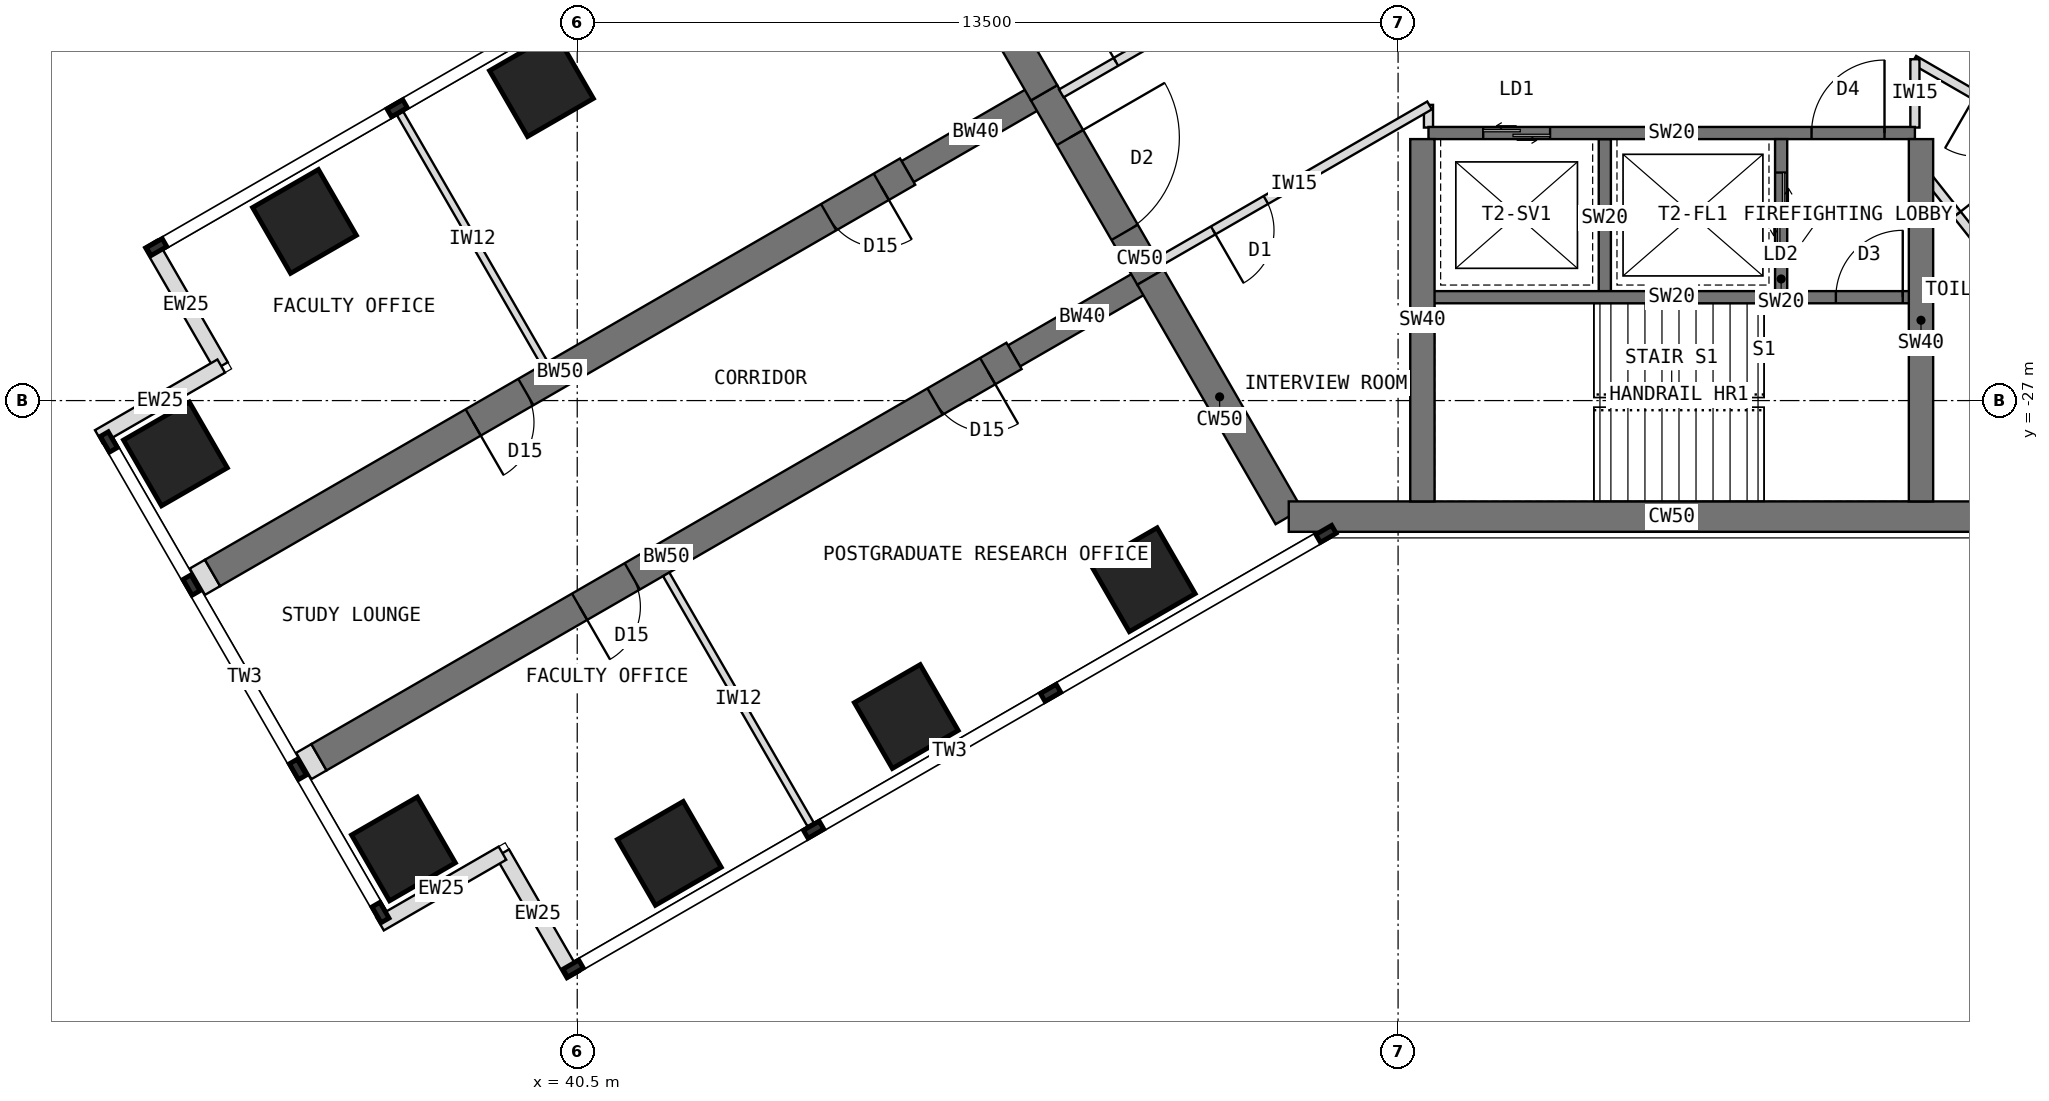
"""IFC4 building model, lengths in metres.
Left out: names, types, materials, properties, quantities, classifications, styles, units other than length and angle.
Written with IfcOpenShell. Run it as: python <this file> out.ifc"""

import sys

from ifc_helpers import new_model, si_unit, direction, frame, frame_2d, origin, origin_2d, place, context, subcontext, project, spatial, rectangle, extrude, element, fill, save


model = new_model("IFC4")
c1 = context("Model", 3, precision=1e-05, world=origin(), true_north=direction((0.0, 1.0)))
c2 = subcontext(c1, "Body", "Model", "MODEL_VIEW")
j1 = project(units=[si_unit("LENGTHUNIT", "METRE"), si_unit("PLANEANGLEUNIT", "RADIAN")], contexts=[c1])
p1 = place(None, origin())
s1 = spatial("IfcSite", under=j1, at=p1, CompositionType="ELEMENT")
p2 = place(p1, origin())
s2 = spatial("IfcBuilding", under=s1, at=p2, CompositionType="ELEMENT")
p3 = place(p2, frame((0.0, 0.0, 170.5)))
s3 = spatial("IfcBuildingStorey", under=s2, at=p3, CompositionType="ELEMENT", Elevation=170.5)
p4 = place(p3, frame((45.904, -18.0, 0.0), z_axis=(0.0, 0.0, 1.0), x_axis=(0.500024481964, -0.866011268655, 0.0)))
e1 = element("IfcWall", 1, at=p4, inside=s3, PredefinedType="SHEAR", context=c2, shape_type="SweptSolid", body=[
    extrude(rectangle(XDim=4.548, YDim=0.5, at=frame_2d((2.274, 0.0))), origin(), (0.0, 0.0, 1.0), 4.0),
])
p5 = place(p3, frame((48.178, -21.939, 0.0), z_axis=(0.0, 0.0, 1.0), x_axis=(0.500010275428, -0.866019471182, 0.0)))
e2 = element("IfcWall", 2, at=p5, inside=s3, PredefinedType="SHEAR", context=c2, shape_type="SweptSolid", body=[
    extrude(rectangle(XDim=3.5, YDim=0.5, at=frame_2d((1.75, 0.0))), origin(), (0.0, 0.0, 1.0), 4.0),
])
p6 = place(p5, frame((0.85, 0.0, 0.0)))
e3 = element("IfcOpeningElement", 3, at=p6, cuts=e2, PredefinedType="OPENING", context=c2, shape_type="SweptSolid", body=[
    extrude(rectangle(XDim=1.8, YDim=2.1, at=frame_2d((0.9, 1.05))), frame((0.0, 0.26, 0.0), z_axis=(0.0, -1.0, 0.0), x_axis=(1.0, 0.0, 0.0)), (0.0, 0.0, 1.0), 0.52),
])
p7 = place(p3, frame((49.928, -24.97, 0.0), z_axis=(0.0, 0.0, 1.0), x_axis=(0.499984222037, -0.866034513004, 0.0)))
e4 = element("IfcWall", 4, at=p7, inside=s3, PredefinedType="SHEAR", context=c2, shape_type="SweptSolid", body=[
    extrude(rectangle(XDim=4.548, YDim=0.5, at=frame_2d((2.274, 0.0))), origin(), (0.0, 0.0, 1.0), 4.0),
])
p8 = place(p3, frame((52.202, -28.908, 0.0), z_axis=(0.0, 0.0, 1.0), x_axis=(1.0, 0.0, 0.0)))
e5 = element("IfcWall", 5, at=p8, inside=s3, PredefinedType="SHEAR", context=c2, shape_type="SweptSolid", body=[
    extrude(rectangle(XDim=12.596, YDim=0.5, at=frame_2d((6.298, 0.0))), origin(), (0.0, 0.0, 1.0), 4.0),
])
p9 = place(p3, frame((49.928, -24.97, 0.0), z_axis=(0.0, 0.0, 1.0), x_axis=(-0.866031863473, -0.499988811324, 0.0)))
e6 = element("IfcWall", 6, at=p9, inside=s3, PredefinedType="SHEAR", context=c2, shape_type="SweptSolid", body=[
    extrude(rectangle(XDim=2.592, YDim=0.4, at=frame_2d((1.296, 0.0))), origin(), (0.0, 0.0, 1.0), 4.0),
])
p10 = place(p3, frame((47.684, -26.266, 0.0), z_axis=(0.0, 0.0, 1.0), x_axis=(-0.866027579429, -0.499996231654, 0.0)))
e7 = element("IfcWall", 7, at=p10, inside=s3, PredefinedType="SHEAR", context=c2, shape_type="SweptSolid", body=[
    extrude(rectangle(XDim=13.2, YDim=0.5, at=frame_2d((6.6, 0.0))), origin(), (0.0, 0.0, 1.0), 4.0),
])
p11 = place(p10, frame((0.5, 0.0, 0.0)))
e8 = element("IfcOpeningElement", 8, at=p11, cuts=e7, PredefinedType="OPENING", context=c2, shape_type="SweptSolid", body=[
    extrude(rectangle(XDim=1.0, YDim=2.1, at=frame_2d((0.5, 1.05))), frame((0.0, 0.26, 0.0), z_axis=(0.0, -1.0, 0.0), x_axis=(1.0, 0.0, 0.0)), (0.0, 0.0, 1.0), 0.52),
])
p12 = place(p10, frame((7.25, 0.0, 0.0)))
e9 = element("IfcOpeningElement", 9, at=p12, cuts=e7, PredefinedType="OPENING", context=c2, shape_type="SweptSolid", body=[
    extrude(rectangle(XDim=1.0, YDim=2.1, at=frame_2d((0.5, 1.05))), frame((0.0, 0.26, 0.0), z_axis=(0.0, -1.0, 0.0), x_axis=(1.0, 0.0, 0.0)), (0.0, 0.0, 1.0), 0.52),
])
p13 = place(p3, frame((48.178, -21.939, 0.0), z_axis=(0.0, 0.0, 1.0), x_axis=(-0.866072649678, -0.499918158782, 0.0)))
e10 = element("IfcWall", 10, at=p13, inside=s3, PredefinedType="SHEAR", context=c2, shape_type="SweptSolid", body=[
    extrude(rectangle(XDim=2.592, YDim=0.4, at=frame_2d((1.296, 0.0))), origin(), (0.0, 0.0, 1.0), 4.0),
])
p14 = place(p3, frame((45.934, -23.234, 0.0), z_axis=(0.0, 0.0, 1.0), x_axis=(-0.866019570528, -0.500010103361, 0.0)))
e11 = element("IfcWall", 11, at=p14, inside=s3, PredefinedType="SHEAR", context=c2, shape_type="SweptSolid", body=[
    extrude(rectangle(XDim=13.2, YDim=0.5, at=frame_2d((6.6, 0.0))), origin(), (0.0, 0.0, 1.0), 4.0),
])
p15 = place(p14, frame((0.5, 0.0, 0.0)))
e12 = element("IfcOpeningElement", 12, at=p15, cuts=e11, PredefinedType="OPENING", context=c2, shape_type="SweptSolid", body=[
    extrude(rectangle(XDim=1.0, YDim=2.1, at=frame_2d((0.5, 1.05))), frame((0.0, 0.26, 0.0), z_axis=(0.0, -1.0, 0.0), x_axis=(1.0, 0.0, 0.0)), (0.0, 0.0, 1.0), 0.52),
])
p16 = place(p14, frame((7.25, 0.0, 0.0)))
e13 = element("IfcOpeningElement", 13, at=p16, cuts=e11, PredefinedType="OPENING", context=c2, shape_type="SweptSolid", body=[
    extrude(rectangle(XDim=1.0, YDim=2.1, at=frame_2d((0.5, 1.05))), frame((0.0, 0.26, 0.0), z_axis=(0.0, -1.0, 0.0), x_axis=(1.0, 0.0, 0.0)), (0.0, 0.0, 1.0), 0.52),
])
for number, where, z_axis, x_axis in (
    (14, (49.809, -29.946, 0.0), (0.0, 0.0, 1.0), (0.866, 0.5, 0.0)),
    (15, (45.912, -32.196, 0.0), (0.0, 0.0, 1.0), (0.866, 0.5, 0.0)),
    (16, (39.912, -21.804, 0.0), (0.0, 0.0, 1.0), (0.866, 0.5, 0.0)),
    (17, (42.014, -34.446, 0.0), (0.0, 0.0, 1.0), (0.866, 0.5, 0.0)),
    (18, (36.014, -24.054, 0.0), (0.0, 0.0, 1.0), (0.866, 0.5, 0.0)),
    (19, (37.642, -34.373, 0.0), (0.0, 0.0, 1.0), (0.866, 0.5, 0.0)),
    (20, (33.892, -27.877, 0.0), (0.0, 0.0, 1.0), (0.866, 0.5, 0.0)),
):
    element("IfcColumn", number, at=place(p3, frame(where, z_axis=z_axis, x_axis=x_axis)), inside=s3, PredefinedType="COLUMN", context=c2, shape_type="SweptSolid", body=[
        extrude(rectangle(XDim=1.25, YDim=1.25, at=origin_2d()), origin(), (0.0, 0.0, 1.0), 4.0),
    ])
for number, where, z_axis, x_axis in (
    (21, (40.433, -36.456, 0.0), (0.0, 0.0, 1.0), (-0.5, 0.866, 0.0)),
    (22, (39.27, -34.443, 0.0), (0.0, 0.0, 1.0), (-0.866, -0.5, 0.0)),
    (23, (33.483, -24.419, 0.0), (0.0, 0.0, 1.0), (0.5, -0.866, 0.0)),
    (24, (34.645, -26.432, 0.0), (0.0, 0.0, 1.0), (-0.866, -0.5, 0.0)),
):
    element("IfcWall", number, at=place(p3, frame(where, z_axis=z_axis, x_axis=x_axis)), inside=s3, PredefinedType="STANDARD", context=c2, shape_type="SweptSolid", body=[
        extrude(rectangle(XDim=2.325, YDim=0.25, at=frame_2d((1.163, 0.0))), origin(), (0.0, 0.0, 1.0), 3.8),
    ])
for number, where, z_axis, x_axis in (
    (25, (36.252, -32.865, 0.0), (0.0, 0.0, 1.0), (-0.866, -0.5, 0.0)),
    (26, (34.502, -29.834, 0.0), (0.0, 0.0, 1.0), (-0.866, -0.5, 0.0)),
):
    element("IfcWall", number, at=place(p3, frame(where, z_axis=z_axis, x_axis=x_axis)), inside=s3, PredefinedType="PARTITIONING", context=c2, shape_type="SweptSolid", body=[
        extrude(rectangle(XDim=0.288, YDim=0.5, at=frame_2d((0.144, 0.0))), origin(), (0.0, 0.0, 1.0), 3.8),
    ])
p17 = place(p3, frame((54.5, -22.6, 0.0), z_axis=(0.0, 0.0, 1.0), x_axis=(1.0, 0.0, 0.0)))
e27 = element("IfcWall", 27, at=p17, inside=s3, PredefinedType="SHEAR", context=c2, shape_type="SweptSolid", body=[
    extrude(rectangle(XDim=8.0, YDim=0.2, at=frame_2d((4.0, 0.0))), origin(), (0.0, 0.0, 1.0), 4.0),
])
p18 = place(p17, frame((6.3, 0.0, 0.0)))
e28 = element("IfcOpeningElement", 28, at=p18, cuts=e27, PredefinedType="OPENING", context=c2, shape_type="SweptSolid", body=[
    extrude(rectangle(XDim=1.2, YDim=2.1, at=frame_2d((0.6, 1.05))), frame((0.0, 0.11, 0.0), z_axis=(0.0, -1.0, 0.0), x_axis=(1.0, 0.0, 0.0)), (0.0, 0.0, 1.0), 0.22),
])
p19 = place(p17, frame((0.9, 0.0, 0.0)))
e29 = element("IfcOpeningElement", 29, at=p19, cuts=e27, PredefinedType="OPENING", context=c2, shape_type="SweptSolid", body=[
    extrude(rectangle(XDim=1.1, YDim=2.2, at=frame_2d((0.55, 1.1))), frame((0.0, 0.11, 0.0), z_axis=(0.0, -1.0, 0.0), x_axis=(1.0, 0.0, 0.0)), (0.0, 0.0, 1.0), 0.22),
])
p20 = place(p3, frame((57.4, -22.7, 0.0), z_axis=(0.0, 0.0, 1.0), x_axis=(0.0, -1.0, 0.0)))
e30 = element("IfcWall", 30, at=p20, inside=s3, PredefinedType="SHEAR", context=c2, shape_type="SweptSolid", body=[
    extrude(rectangle(XDim=2.6, YDim=0.2, at=frame_2d((1.3, 0.0))), origin(), (0.0, 0.0, 1.0), 4.0),
])
p21 = place(p3, frame((60.3, -22.7, 0.0), z_axis=(0.0, 0.0, 1.0), x_axis=(0.0, -1.0, 0.0)))
e31 = element("IfcWall", 31, at=p21, inside=s3, PredefinedType="SHEAR", context=c2, shape_type="SweptSolid", body=[
    extrude(rectangle(XDim=2.6, YDim=0.2, at=frame_2d((1.3, 0.0))), origin(), (0.0, 0.0, 1.0), 4.0),
])
p22 = place(p21, frame((0.55, 0.0, 0.0)))
e32 = element("IfcOpeningElement", 32, at=p22, cuts=e31, PredefinedType="OPENING", context=c2, shape_type="SweptSolid", body=[
    extrude(rectangle(XDim=1.3, YDim=2.2, at=frame_2d((0.65, 1.1))), frame((0.0, 0.11, 0.0), z_axis=(0.0, -1.0, 0.0), x_axis=(1.0, 0.0, 0.0)), (0.0, 0.0, 1.0), 0.22),
])
p23 = place(p3, frame((54.5, -25.3, 0.0), z_axis=(0.0, 0.0, 1.0), x_axis=(1.0, 0.0, 0.0)))
e33 = element("IfcWall", 33, at=p23, inside=s3, PredefinedType="SHEAR", context=c2, shape_type="SweptSolid", body=[
    extrude(rectangle(XDim=8.0, YDim=0.2, at=frame_2d((4.0, 0.0))), origin(), (0.0, 0.0, 1.0), 4.0),
])
p24 = place(p23, frame((6.7, 0.0, 0.0)))
e34 = element("IfcOpeningElement", 34, at=p24, cuts=e33, PredefinedType="OPENING", context=c2, shape_type="SweptSolid", body=[
    extrude(rectangle(XDim=1.1, YDim=2.1, at=frame_2d((0.55, 1.05))), frame((0.0, 0.11, 0.0), z_axis=(0.0, -1.0, 0.0), x_axis=(1.0, 0.0, 0.0)), (0.0, 0.0, 1.0), 0.22),
])
for number, where, z_axis, x_axis in (
    (35, (62.6, -22.7, 0.0), (0.0, 0.0, 1.0), (0.0, -1.0, 0.0)),
    (36, (54.4, -22.7, 0.0), (0.0, 0.0, 1.0), (0.0, -1.0, 0.0)),
):
    element("IfcWall", number, at=place(p3, frame(where, z_axis=z_axis, x_axis=x_axis)), inside=s3, PredefinedType="SHEAR", context=c2, shape_type="SweptSolid", body=[
        extrude(rectangle(XDim=5.958, YDim=0.4, at=frame_2d((2.979, 0.0))), origin(), (0.0, 0.0, 1.0), 4.0),
    ])
for number, where, z_axis, x_axis in (
    (37, (41.963, -29.857, 0.0), (0.0, 0.0, 1.0), (0.5, -0.866, 0.0)),
    (38, (39.963, -26.393, 0.0), (0.0, 0.0, 1.0), (-0.5, 0.866, 0.0)),
):
    element("IfcWall", number, at=place(p3, frame(where, z_axis=z_axis, x_axis=x_axis)), inside=s3, PredefinedType="PARTITIONING", context=c2, shape_type="SweptSolid", body=[
        extrude(rectangle(XDim=4.75, YDim=0.12, at=frame_2d((2.375, 0.0))), origin(), (0.0, 0.0, 1.0), 3.8),
    ])
p25 = place(p3, frame((54.5, -22.51, 0.0), z_axis=(0.0, 0.0, 1.0), x_axis=(0.0, 1.0, 0.0)))
e39 = element("IfcWall", 39, at=p25, inside=s3, PredefinedType="PARTITIONING", context=c2, shape_type="SweptSolid", body=[
    extrude(rectangle(XDim=0.373, YDim=0.15, at=frame_2d((0.187, 0.0))), origin(), (0.0, 0.0, 1.0), 3.8),
])
p26 = place(p3, frame((54.517, -22.147, 0.0), z_axis=(0.0, 0.0, 1.0), x_axis=(-0.866033096941, -0.499986674824, 0.0)))
e40 = element("IfcWall", 40, at=p26, inside=s3, PredefinedType="PARTITIONING", context=c2, shape_type="SweptSolid", body=[
    extrude(rectangle(XDim=5.146, YDim=0.15, at=frame_2d((2.573, 0.0))), origin(), (0.0, 0.0, 1.0), 3.8),
])
p27 = place(p26, frame((3.108, 0.0, 0.0)))
e41 = element("IfcOpeningElement", 41, at=p27, cuts=e40, PredefinedType="OPENING", context=c2, shape_type="SweptSolid", body=[
    extrude(rectangle(XDim=1.0, YDim=2.1, at=frame_2d((0.5, 1.05))), frame((0.0, 0.085, 0.0), z_axis=(0.0, -1.0, 0.0), x_axis=(1.0, 0.0, 0.0)), (0.0, 0.0, 1.0), 0.17),
])
p28 = place(p3, frame((48.461, -21.948, 0.0), z_axis=(0.0, 0.0, 1.0), x_axis=(0.866012552312, 0.500022258742, 0.0)))
e42 = element("IfcWall", 42, at=p28, inside=s3, PredefinedType="PARTITIONING", context=c2, shape_type="SweptSolid", body=[
    extrude(rectangle(XDim=5.146, YDim=0.15, at=frame_2d((2.573, 0.0))), origin(), (0.0, 0.0, 1.0), 3.8),
])
p29 = place(p28, frame((1.038, 0.0, 0.0)))
e43 = element("IfcOpeningElement", 43, at=p29, cuts=e42, PredefinedType="OPENING", context=c2, shape_type="SweptSolid", body=[
    extrude(rectangle(XDim=1.0, YDim=2.1, at=frame_2d((0.5, 1.05))), frame((0.0, 0.085, 0.0), z_axis=(0.0, -1.0, 0.0), x_axis=(1.0, 0.0, 0.0)), (0.0, 0.0, 1.0), 0.17),
])
p30 = place(p3, frame((63.433, -19.751, 0.0), z_axis=(0.0, 0.0, 1.0), x_axis=(0.866033158832, -0.499986567624, 0.0)))
e44 = element("IfcWall", 44, at=p30, inside=s3, PredefinedType="PARTITIONING", context=c2, shape_type="SweptSolid", body=[
    extrude(rectangle(XDim=5.521, YDim=0.15, at=frame_2d((2.761, 0.0))), origin(), (0.0, 0.0, 1.0), 3.8),
])
p31 = place(p30, frame((1.17, 0.0, 0.0)))
e45 = element("IfcOpeningElement", 45, at=p31, cuts=e44, PredefinedType="OPENING", context=c2, shape_type="SweptSolid", body=[
    extrude(rectangle(XDim=1.0, YDim=2.1, at=frame_2d((0.5, 1.05))), frame((0.0, 0.085, 0.0), z_axis=(0.0, -1.0, 0.0), x_axis=(1.0, 0.0, 0.0)), (0.0, 0.0, 1.0), 0.17),
])
p32 = place(p3, frame((67.264, -24.157, 0.0), z_axis=(0.0, 0.0, 1.0), x_axis=(-0.866022103989, 0.50000571537, 0.0)))
e46 = element("IfcWall", 46, at=p32, inside=s3, PredefinedType="PARTITIONING", context=c2, shape_type="SweptSolid", body=[
    extrude(rectangle(XDim=5.521, YDim=0.15, at=frame_2d((2.76, 0.0))), origin(), (0.0, 0.0, 1.0), 3.8),
])
p33 = place(p32, frame((3.351, 0.0, 0.0)))
e47 = element("IfcOpeningElement", 47, at=p33, cuts=e46, PredefinedType="OPENING", context=c2, shape_type="SweptSolid", body=[
    extrude(rectangle(XDim=1.0, YDim=2.1, at=frame_2d((0.5, 1.05))), frame((0.0, 0.085, 0.0), z_axis=(0.0, -1.0, 0.0), x_axis=(1.0, 0.0, 0.0)), (0.0, 0.0, 1.0), 0.17),
])
p34 = place(p3, frame((62.5, -21.386, 0.0), z_axis=(0.0, 0.0, 1.0), x_axis=(0.0, -1.0, 0.0)))
e48 = element("IfcWall", 48, at=p34, inside=s3, PredefinedType="PARTITIONING", context=c2, shape_type="SweptSolid", body=[
    extrude(rectangle(XDim=1.124, YDim=0.15, at=frame_2d((0.562, 0.0))), origin(), (0.0, 0.0, 1.0), 3.8),
])
p35 = place(p3, frame((62.6, -23.187, 0.0), z_axis=(0.0, 0.0, 1.0), x_axis=(0.620111874039, -0.784513392923, 0.0)))
e49 = element("IfcWall", 49, at=p35, inside=s3, PredefinedType="PARTITIONING", context=c2, shape_type="SweptSolid", body=[
    extrude(rectangle(XDim=4.857, YDim=0.15, at=frame_2d((2.429, 0.0))), origin(), (0.0, 0.0, 1.0), 3.8),
])
p36 = place(p35, frame((0.957, 0.0, 0.0)))
e50 = element("IfcOpeningElement", 50, at=p36, cuts=e49, PredefinedType="OPENING", context=c2, shape_type="SweptSolid", body=[
    extrude(rectangle(XDim=1.0, YDim=2.1, at=frame_2d((0.5, 1.05))), frame((0.0, 0.085, 0.0), z_axis=(0.0, -1.0, 0.0), x_axis=(1.0, 0.0, 0.0)), (0.0, 0.0, 1.0), 0.17),
])
p37 = place(p18, origin())
e51 = element("IfcDoor", 51, at=p37, inside=s3, OperationType="SINGLE_SWING_RIGHT", PredefinedType="DOOR", context=c2, shape_type="SweptSolid", body=[
    extrude(rectangle(XDim=1.2, YDim=2.1, at=frame_2d((0.6, 1.05))), frame((0.0, 0.025, 0.0), z_axis=(0.0, -1.0, 0.0), x_axis=(1.0, 0.0, 0.0)), (0.0, 0.0, 1.0), 0.05),
])
fill(e28, e51)
p38 = place(p22, origin())
e52 = element("IfcDoor", 52, at=p38, inside=s3, OperationType="DOUBLE_DOOR_SLIDING", PredefinedType="DOOR", context=c2, shape_type="SweptSolid", body=[
    extrude(rectangle(XDim=1.3, YDim=2.2, at=frame_2d((0.65, 1.1))), frame((0.0, 0.025, 0.0), z_axis=(0.0, -1.0, 0.0), x_axis=(1.0, 0.0, 0.0)), (0.0, 0.0, 1.0), 0.05),
])
fill(e32, e52)
p39 = place(p19, origin())
e53 = element("IfcDoor", 53, at=p39, inside=s3, OperationType="DOUBLE_DOOR_SLIDING", PredefinedType="DOOR", context=c2, shape_type="SweptSolid", body=[
    extrude(rectangle(XDim=1.1, YDim=2.2, at=frame_2d((0.55, 1.1))), frame((0.0, 0.025, 0.0), z_axis=(0.0, -1.0, 0.0), x_axis=(1.0, 0.0, 0.0)), (0.0, 0.0, 1.0), 0.05),
])
fill(e29, e53)
p40 = place(p24, origin())
e54 = element("IfcDoor", 54, at=p40, inside=s3, OperationType="SINGLE_SWING_RIGHT", PredefinedType="DOOR", context=c2, shape_type="SweptSolid", body=[
    extrude(rectangle(XDim=1.1, YDim=2.1, at=frame_2d((0.55, 1.05))), frame((0.0, 0.025, 0.0), z_axis=(0.0, -1.0, 0.0), x_axis=(1.0, 0.0, 0.0)), (0.0, 0.0, 1.0), 0.05),
])
fill(e34, e54)
p41 = place(p6, origin())
e55 = element("IfcDoor", 55, at=p41, inside=s3, OperationType="DOUBLE_DOOR_DOUBLE_SWING", PredefinedType="DOOR", context=c2, shape_type="SweptSolid", body=[
    extrude(rectangle(XDim=1.8, YDim=2.1, at=frame_2d((0.9, 1.05))), frame((0.0, 0.025, 0.0), z_axis=(0.0, -1.0, 0.0), x_axis=(1.0, 0.0, 0.0)), (0.0, 0.0, 1.0), 0.05),
])
fill(e3, e55)
p42 = place(p29, origin())
e56 = element("IfcDoor", 56, at=p42, inside=s3, OperationType="SINGLE_SWING_LEFT", PredefinedType="DOOR", context=c2, shape_type="SweptSolid", body=[
    extrude(rectangle(XDim=1.0, YDim=2.1, at=frame_2d((0.5, 1.05))), frame((0.0, 0.025, 0.0), z_axis=(0.0, -1.0, 0.0), x_axis=(1.0, 0.0, 0.0)), (0.0, 0.0, 1.0), 0.05),
])
fill(e43, e56)
p43 = place(p27, origin())
e57 = element("IfcDoor", 57, at=p43, inside=s3, OperationType="SINGLE_SWING_RIGHT", PredefinedType="DOOR", context=c2, shape_type="SweptSolid", body=[
    extrude(rectangle(XDim=1.0, YDim=2.1, at=frame_2d((0.5, 1.05))), frame((0.0, 0.025, 0.0), z_axis=(0.0, -1.0, 0.0), x_axis=(1.0, 0.0, 0.0)), (0.0, 0.0, 1.0), 0.05),
])
fill(e41, e57)
p44 = place(p36, origin())
e58 = element("IfcDoor", 58, at=p44, inside=s3, OperationType="SINGLE_SWING_LEFT", PredefinedType="DOOR", context=c2, shape_type="SweptSolid", body=[
    extrude(rectangle(XDim=1.0, YDim=2.1, at=frame_2d((0.5, 1.05))), frame((0.0, 0.025, 0.0), z_axis=(0.0, -1.0, 0.0), x_axis=(1.0, 0.0, 0.0)), (0.0, 0.0, 1.0), 0.05),
])
fill(e50, e58)
p45 = place(p11, origin())
e59 = element("IfcDoor", 59, at=p45, inside=s3, OperationType="SINGLE_SWING_LEFT", PredefinedType="DOOR", context=c2, shape_type="SweptSolid", body=[
    extrude(rectangle(XDim=1.0, YDim=2.1, at=frame_2d((0.5, 1.05))), frame((0.0, 0.025, 0.0), z_axis=(0.0, -1.0, 0.0), x_axis=(1.0, 0.0, 0.0)), (0.0, 0.0, 1.0), 0.05),
])
fill(e8, e59)
p46 = place(p12, origin())
e60 = element("IfcDoor", 60, at=p46, inside=s3, OperationType="SINGLE_SWING_RIGHT", PredefinedType="DOOR", context=c2, shape_type="SweptSolid", body=[
    extrude(rectangle(XDim=1.0, YDim=2.1, at=frame_2d((0.5, 1.05))), frame((0.0, 0.025, 0.0), z_axis=(0.0, -1.0, 0.0), x_axis=(1.0, 0.0, 0.0)), (0.0, 0.0, 1.0), 0.05),
])
fill(e9, e60)
p47 = place(p15, origin())
e61 = element("IfcDoor", 61, at=p47, inside=s3, OperationType="SINGLE_SWING_LEFT", PredefinedType="DOOR", context=c2, shape_type="SweptSolid", body=[
    extrude(rectangle(XDim=1.0, YDim=2.1, at=frame_2d((0.5, 1.05))), frame((0.0, 0.025, 0.0), z_axis=(0.0, -1.0, 0.0), x_axis=(1.0, 0.0, 0.0)), (0.0, 0.0, 1.0), 0.05),
])
fill(e12, e61)
p48 = place(p16, origin())
e62 = element("IfcDoor", 62, at=p48, inside=s3, OperationType="SINGLE_SWING_RIGHT", PredefinedType="DOOR", context=c2, shape_type="SweptSolid", body=[
    extrude(rectangle(XDim=1.0, YDim=2.1, at=frame_2d((0.5, 1.05))), frame((0.0, 0.025, 0.0), z_axis=(0.0, -1.0, 0.0), x_axis=(1.0, 0.0, 0.0)), (0.0, 0.0, 1.0), 0.05),
])
fill(e13, e62)
save(model, sys.argv[1])
